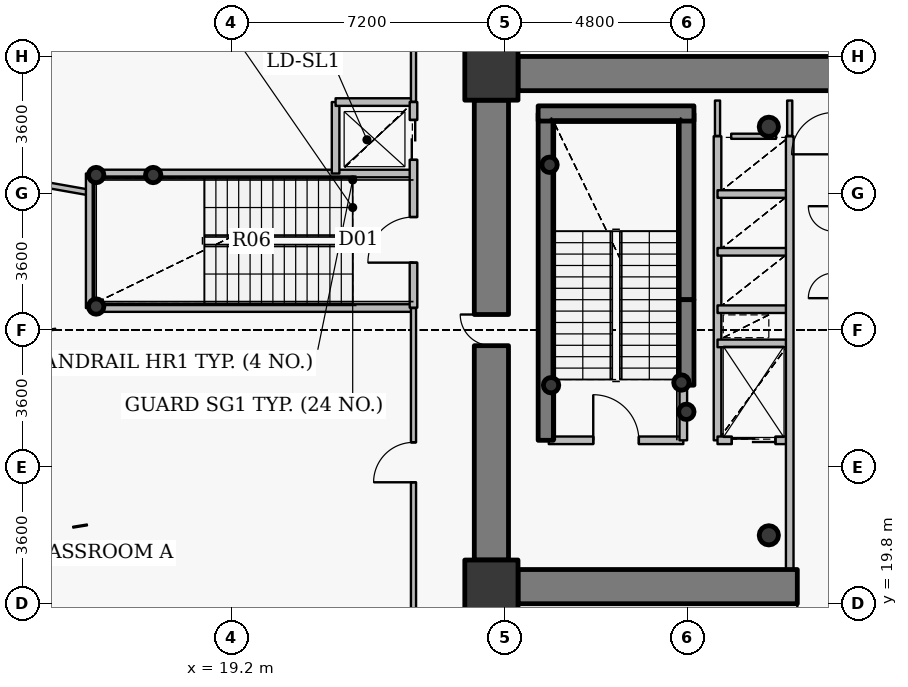
"""IFC4 building model, lengths in metres.
Left out: names, types, materials, properties, quantities, classifications, styles, units other than length and angle.
Written with IfcOpenShell. Run it as: python <this file> out.ifc"""

import sys

from ifc_helpers import new_model, si_unit, direction, frame, frame_2d, origin, origin_2d, place, context, subcontext, project, spatial, rectangle, hollow_circle, extrude, source, transform, mapped, element, fill, save


model = new_model("IFC4")
c1 = context("Model", 3, precision=1e-05, world=origin(), true_north=direction((0.0, 1.0)))
c2 = subcontext(c1, "Body", "Model", "MODEL_VIEW")
j1 = project(units=[si_unit("LENGTHUNIT", "METRE"), si_unit("PLANEANGLEUNIT", "RADIAN")], contexts=[c1])
p1 = place(None, origin())
s1 = spatial("IfcSite", under=j1, at=p1, CompositionType="ELEMENT")
p2 = place(p1, origin())
s2 = spatial("IfcBuilding", under=s1, at=p2, CompositionType="ELEMENT")
p3 = place(p2, frame((0.0, 0.0, 32.4)))
s3 = spatial("IfcBuildingStorey", under=s2, at=p3, CompositionType="ELEMENT", Elevation=32.4)
for number, where, z_axis, x_axis in (
    (1, (26.05, 20.25, 0.0), (0.0, 0.0, 1.0), (1.0, 0.0, 0.0)),
    (2, (26.05, 33.75, 0.0), (0.0, 0.0, 1.0), (1.0, 0.0, 0.0)),
):
    element("IfcColumn", number, at=place(p3, frame(where, z_axis=z_axis, x_axis=x_axis)), inside=s3, PredefinedType="COLUMN", context=c2, shape_type="SweptSolid", body=[
        extrude(rectangle(XDim=1.4, YDim=1.4, at=origin_2d()), origin(), (0.0, 0.0, 1.0), 4.2),
    ])
for number, where, z_axis, x_axis in (
    (3, (33.35, 21.6, 0.0), (0.0, 0.0, 1.0), (1.0, 0.0, 0.0)),
    (4, (33.35, 32.35, 0.0), (0.0, 0.0, 1.0), (1.0, 0.0, 0.0)),
):
    element("IfcColumn", number, at=place(p3, frame(where, z_axis=z_axis, x_axis=x_axis)), inside=s3, PredefinedType="COLUMN", context=c2, shape_type="SweptSolid", body=[
        extrude(hollow_circle(Radius=0.254, WallThickness=0.02, at=origin_2d()), origin(), (0.0, 0.0, 1.0), 4.2),
    ])
p4 = place(p3, frame((27.48, 24.1, 0.0), z_axis=(0.0, 0.0, 1.0), x_axis=(0.0, 1.0, 0.0)))
e5 = element("IfcWall", 5, at=p4, inside=s3, PredefinedType="SHEAR", context=c2, shape_type="SweptSolid", body=[
    extrude(rectangle(XDim=8.6, YDim=0.4, at=frame_2d((4.3, 0.0))), origin(), (0.0, 0.0, 1.0), 4.2),
])
p5 = place(p3, frame((31.18, 27.8, 0.0), z_axis=(0.0, 0.0, 1.0), x_axis=(0.0, 1.0, 0.0)))
e6 = element("IfcWall", 6, at=p5, inside=s3, PredefinedType="SHEAR", context=c2, shape_type="SweptSolid", body=[
    extrude(rectangle(XDim=4.9, YDim=0.4, at=frame_2d((2.45, 0.0))), origin(), (0.0, 0.0, 1.0), 4.2),
])
p6 = place(p3, frame((27.28, 32.7, 0.0), z_axis=(0.0, 0.0, 1.0), x_axis=(1.0, 0.0, 0.0)))
e7 = element("IfcWall", 7, at=p6, inside=s3, PredefinedType="SHEAR", context=c2, shape_type="SweptSolid", body=[
    extrude(rectangle(XDim=4.1, YDim=0.4, at=frame_2d((2.05, 0.0))), origin(), (0.0, 0.0, 1.0), 4.2),
])
for number, where, z_axis, x_axis in (
    (8, (27.58, 31.35, 0.0), (0.0, 0.0, 1.0), (1.0, 0.0, 0.0)),
    (9, (31.05, 25.62, 0.0), (0.0, 0.0, 1.0), (1.0, 0.0, 0.0)),
    (10, (31.18, 24.85, 0.0), (0.0, 0.0, 1.0), (1.0, 0.0, 0.0)),
    (11, (27.62, 25.55, 0.0), (0.0, 0.0, 1.0), (1.0, 0.0, 0.0)),
    (12, (15.65, 27.62, 0.0), (0.0, 0.0, 1.0), (1.0, 0.0, 0.0)),
    (13, (15.65, 31.08, 0.0), (0.0, 0.0, 1.0), (1.0, 0.0, 0.0)),
    (14, (17.15, 31.08, 0.0), (0.0, 0.0, 1.0), (1.0, 0.0, 0.0)),
):
    element("IfcColumn", number, at=place(p3, frame(where, z_axis=z_axis, x_axis=x_axis)), inside=s3, PredefinedType="COLUMN", context=c2, shape_type="SweptSolid", body=[
        extrude(hollow_circle(Radius=0.203, WallThickness=0.016, at=origin_2d()), origin(), (0.0, 0.0, 1.0), 4.2),
    ])
p7 = place(p3, frame((26.75, 33.75, 0.0), z_axis=(0.0, 0.0, 1.0), x_axis=(1.0, 0.0, 0.0)))
e15 = element("IfcWall", 15, at=p7, inside=s3, PredefinedType="SHEAR", context=c2, shape_type="SweptSolid", body=[
    extrude(rectangle(XDim=18.5, YDim=0.9, at=frame_2d((9.25, 0.0))), origin(), (0.0, 0.0, 1.0), 3.4),
])
p8 = place(p3, frame((45.25, 20.25, 0.0), z_axis=(0.0, 0.0, 1.0), x_axis=(-1.0, 0.0, 0.0)))
e16 = element("IfcWall", 16, at=p8, inside=s3, PredefinedType="SHEAR", context=c2, shape_type="SweptSolid", body=[
    extrude(rectangle(XDim=18.5, YDim=0.9, at=frame_2d((9.25, 0.0))), origin(), (0.0, 0.0, 1.0), 3.4),
])
p9 = place(p8, frame((10.0, 0.0, 0.0)))
e17 = element("IfcOpeningElement", 17, at=p9, cuts=e16, PredefinedType="OPENING", context=c2, shape_type="SweptSolid", body=[
    extrude(rectangle(XDim=1.15, YDim=2.15, at=origin_2d()), frame((0.575, 0.46, 1.075), z_axis=(0.0, -1.0, 0.0), x_axis=(1.0, 0.0, 0.0)), (0.0, 0.0, 1.0), 0.92),
])
p10 = place(p3, frame((26.05, 20.95, 0.0), z_axis=(0.0, 0.0, 1.0), x_axis=(0.0, 1.0, 0.0)))
e18 = element("IfcWall", 18, at=p10, inside=s3, PredefinedType="SHEAR", context=c2, shape_type="SweptSolid", body=[
    extrude(rectangle(XDim=12.1, YDim=0.9, at=frame_2d((6.05, 0.0))), origin(), (0.0, 0.0, 1.0), 3.4),
])
p11 = place(p10, frame((5.64, 0.0, 0.0)))
e19 = element("IfcOpeningElement", 19, at=p11, cuts=e18, PredefinedType="OPENING", context=c2, shape_type="SweptSolid", body=[
    extrude(rectangle(XDim=0.82, YDim=2.1, at=origin_2d()), frame((0.41, 0.46, 1.05), z_axis=(0.0, -1.0, 0.0), x_axis=(1.0, 0.0, 0.0)), (0.0, 0.0, 1.0), 0.92),
])
p12 = place(p3, frame((31.18, 25.55, 0.0), z_axis=(0.0, 0.0, 1.0), x_axis=(0.0, 1.0, 0.0)))
e20 = element("IfcWall", 20, at=p12, inside=s3, PredefinedType="SHEAR", context=c2, shape_type="SweptSolid", body=[
    extrude(rectangle(XDim=2.25, YDim=0.4, at=frame_2d((1.125, 0.0))), origin(), (0.0, 0.0, 1.0), 3.55),
])
p13 = place(p3, frame((5.771, 32.33, 0.0), z_axis=(0.0, 0.0, 1.0), x_axis=(0.984806985247, -0.173652531825, 0.0)))
e21 = element("IfcWall", 21, at=p13, inside=s3, PredefinedType="PARTITIONING", context=c2, shape_type="SweptSolid", body=[
    extrude(rectangle(XDim=9.858, YDim=0.15, at=frame_2d((4.929, 0.0))), origin(), (0.0, 0.0, 1.0), 3.335),
])
p14 = place(p3, frame((15.48, 27.58, 0.0), z_axis=(0.0, 0.0, 1.0), x_axis=(0.0, 1.0, 0.0)))
e22 = element("IfcWall", 22, at=p14, inside=s3, PredefinedType="PARTITIONING", context=c2, shape_type="SweptSolid", body=[
    extrude(rectangle(XDim=3.54, YDim=0.2, at=frame_2d((1.77, 0.0))), origin(), (0.0, 0.0, 1.0), 3.95),
])
for number, where, z_axis, x_axis in (
    (23, (15.48, 27.58, 0.0), (0.0, 0.0, 1.0), (1.0, 0.0, 0.0)),
    (24, (15.48, 31.12, 0.0), (0.0, 0.0, 1.0), (1.0, 0.0, 0.0)),
):
    element("IfcWall", number, at=place(p3, frame(where, z_axis=z_axis, x_axis=x_axis)), inside=s3, PredefinedType="PARTITIONING", context=c2, shape_type="SweptSolid", body=[
        extrude(rectangle(XDim=8.52, YDim=0.2, at=frame_2d((4.26, 0.0))), origin(), (0.0, 0.0, 1.0), 3.95),
    ])
p15 = place(p3, frame((21.95, 31.12, 0.0), z_axis=(0.0, 0.0, 1.0), x_axis=(0.0, 1.0, 0.0)))
e25 = element("IfcWall", 25, at=p15, inside=s3, PredefinedType="PARTITIONING", context=c2, shape_type="SweptSolid", body=[
    extrude(rectangle(XDim=1.88, YDim=0.2, at=frame_2d((0.94, 0.0))), origin(), (0.0, 0.0, 1.0), 3.285),
])
p16 = place(p3, frame((21.95, 33.0, 0.0), z_axis=(0.0, 0.0, 1.0), x_axis=(1.0, 0.0, 0.0)))
e26 = element("IfcWall", 26, at=p16, inside=s3, PredefinedType="PARTITIONING", context=c2, shape_type="SweptSolid", body=[
    extrude(rectangle(XDim=2.05, YDim=0.2, at=frame_2d((1.025, 0.0))), origin(), (0.0, 0.0, 1.0), 3.95),
])
p17 = place(p3, frame((24.0, 14.8, 0.0), z_axis=(0.0, 0.0, 1.0), x_axis=(0.0, 1.0, 0.0)))
e27 = element("IfcWall", 27, at=p17, inside=s3, PredefinedType="PARTITIONING", context=c2, shape_type="SweptSolid", body=[
    extrude(rectangle(XDim=12.78, YDim=0.135, at=frame_2d((6.39, 0.0))), origin(), (0.0, 0.0, 1.0), 3.285),
])
p18 = place(p17, frame((8.196, 0.0, 0.0)))
e28 = element("IfcOpeningElement", 28, at=p18, cuts=e27, PredefinedType="OPENING", context=c2, shape_type="SweptSolid", body=[
    extrude(rectangle(XDim=1.05, YDim=2.15, at=origin_2d()), frame((0.525, 0.078, 1.075), z_axis=(0.0, -1.0, 0.0), x_axis=(1.0, 0.0, 0.0)), (0.0, 0.0, 1.0), 0.155),
])
p19 = place(p3, frame((24.0, 27.59, 0.0), z_axis=(0.0, 0.0, 1.0), x_axis=(0.0, 1.0, 0.0)))
e29 = element("IfcWall", 29, at=p19, inside=s3, PredefinedType="PARTITIONING", context=c2, shape_type="SweptSolid", body=[
    extrude(rectangle(XDim=5.41, YDim=0.2, at=frame_2d((2.705, 0.0))), origin(), (0.0, 0.0, 1.0), 3.285),
])
p20 = place(p19, frame((1.185, 0.0, 0.0)))
e30 = element("IfcOpeningElement", 30, at=p20, cuts=e29, PredefinedType="OPENING", context=c2, shape_type="SweptSolid", body=[
    extrude(rectangle(XDim=1.2, YDim=2.15, at=origin_2d()), frame((0.6, 0.11, 1.075), z_axis=(0.0, -1.0, 0.0), x_axis=(1.0, 0.0, 0.0)), (0.0, 0.0, 1.0), 0.22),
])
p21 = place(p19, frame((3.89, 0.0, 0.0)))
e31 = element("IfcOpeningElement", 31, at=p21, cuts=e29, PredefinedType="OPENING", context=c2, shape_type="SweptSolid", body=[
    extrude(rectangle(XDim=1.05, YDim=2.15, at=origin_2d()), frame((0.525, 0.11, 1.075), z_axis=(0.0, -1.0, 0.0), x_axis=(1.0, 0.0, 0.0)), (0.0, 0.0, 1.0), 0.22),
])
p22 = place(p3, frame((24.0, 33.01, 0.0), z_axis=(0.0, 0.0, 1.0), x_axis=(0.0, 1.0, 0.0)))
e32 = element("IfcWall", 32, at=p22, inside=s3, PredefinedType="PARTITIONING", context=c2, shape_type="SweptSolid", body=[
    extrude(rectangle(XDim=8.19, YDim=0.135, at=frame_2d((4.095, 0.0))), origin(), (0.0, 0.0, 1.0), 3.285),
])
p23 = place(p22, frame((3.57, 0.0, 0.0)))
e33 = element("IfcOpeningElement", 33, at=p23, cuts=e32, PredefinedType="OPENING", context=c2, shape_type="SweptSolid", body=[
    extrude(rectangle(XDim=1.05, YDim=2.15, at=origin_2d()), frame((0.525, 0.078, 1.075), z_axis=(0.0, -1.0, 0.0), x_axis=(1.0, 0.0, 0.0)), (0.0, 0.0, 1.0), 0.155),
])
p24 = place(p3, frame((27.56, 24.1, 0.0), z_axis=(0.0, 0.0, 1.0), x_axis=(1.0, 0.0, 0.0)))
e34 = element("IfcWall", 34, at=p24, inside=s3, PredefinedType="PARTITIONING", context=c2, shape_type="SweptSolid", body=[
    extrude(rectangle(XDim=3.54, YDim=0.2, at=frame_2d((1.77, 0.0))), origin(), (0.0, 0.0, 1.0), 3.95),
])
p25 = place(p24, frame((1.17, 0.0, 0.0)))
e35 = element("IfcOpeningElement", 35, at=p25, cuts=e34, PredefinedType="OPENING", context=c2, shape_type="SweptSolid", body=[
    extrude(rectangle(XDim=1.2, YDim=2.15, at=origin_2d()), frame((0.6, 0.11, 1.075), z_axis=(0.0, -1.0, 0.0), x_axis=(1.0, 0.0, 0.0)), (0.0, 0.0, 1.0), 0.22),
])
p26 = place(p3, frame((31.1, 24.1, 0.0), z_axis=(0.0, 0.0, 1.0), x_axis=(0.0, 1.0, 0.0)))
e36 = element("IfcWall", 36, at=p26, inside=s3, PredefinedType="PARTITIONING", context=c2, shape_type="SweptSolid", body=[
    extrude(rectangle(XDim=1.44, YDim=0.2, at=frame_2d((0.72, 0.0))), origin(), (0.0, 0.0, 1.0), 3.95),
])
p27 = place(p3, frame((32.0, 24.1, 0.0), z_axis=(0.0, 0.0, 1.0), x_axis=(0.0, 1.0, 0.0)))
e37 = element("IfcWall", 37, at=p27, inside=s3, PredefinedType="PARTITIONING", context=c2, shape_type="SweptSolid", body=[
    extrude(rectangle(XDim=8.0, YDim=0.2, at=frame_2d((4.0, 0.0))), origin(), (0.0, 0.0, 1.0), 3.95),
])
p28 = place(p3, frame((32.0, 24.1, 0.0), z_axis=(0.0, 0.0, 1.0), x_axis=(1.0, 0.0, 0.0)))
e38 = element("IfcWall", 38, at=p28, inside=s3, PredefinedType="PARTITIONING", context=c2, shape_type="SweptSolid", body=[
    extrude(rectangle(XDim=1.9, YDim=0.2, at=frame_2d((0.95, 0.0))), origin(), (0.0, 0.0, 1.0), 3.535),
])
p29 = place(p28, frame((0.375, 0.0, 0.0)))
e39 = element("IfcOpeningElement", 39, at=p29, cuts=e38, PredefinedType="OPENING", context=c2, shape_type="SweptSolid", body=[
    extrude(rectangle(XDim=1.15, YDim=2.15, at=origin_2d()), frame((0.575, 0.11, 1.075), z_axis=(0.0, -1.0, 0.0), x_axis=(1.0, 0.0, 0.0)), (0.0, 0.0, 1.0), 0.22),
])
for number, where, z_axis, x_axis in (
    (40, (32.0, 26.65, 0.0), (0.0, 0.0, 1.0), (1.0, 0.0, 0.0)),
    (41, (32.0, 27.55, 0.0), (0.0, 0.0, 1.0), (1.0, 0.0, 0.0)),
    (42, (32.0, 29.06, 0.0), (0.0, 0.0, 1.0), (1.0, 0.0, 0.0)),
    (43, (32.0, 30.58, 0.0), (0.0, 0.0, 1.0), (1.0, 0.0, 0.0)),
):
    element("IfcWall", number, at=place(p3, frame(where, z_axis=z_axis, x_axis=x_axis)), inside=s3, PredefinedType="PARTITIONING", context=c2, shape_type="SweptSolid", body=[
        extrude(rectangle(XDim=1.9, YDim=0.2, at=frame_2d((0.95, 0.0))), origin(), (0.0, 0.0, 1.0), 3.535),
    ])
p30 = place(p3, frame((33.9, 20.7, 0.0), z_axis=(0.0, 0.0, 1.0), x_axis=(0.0, 1.0, 0.0)))
e44 = element("IfcWall", 44, at=p30, inside=s3, PredefinedType="PARTITIONING", context=c2, shape_type="SweptSolid", body=[
    extrude(rectangle(XDim=11.4, YDim=0.2, at=frame_2d((5.7, 0.0))), origin(), (0.0, 0.0, 1.0), 3.535),
])
p31 = place(p3, frame((32.36, 32.1, 0.0), z_axis=(0.0, 0.0, 1.0), x_axis=(1.0, 0.0, 0.0)))
e45 = element("IfcWall", 45, at=p31, inside=s3, PredefinedType="PARTITIONING", context=c2, shape_type="SweptSolid", body=[
    extrude(rectangle(XDim=1.18, YDim=0.135, at=frame_2d((0.59, 0.0))), origin(), (0.0, 0.0, 1.0), 3.535),
])
p32 = place(p3, frame((32.0, 33.04, 0.0), z_axis=(0.0, 0.0, 1.0), x_axis=(0.0, -1.0, 0.0)))
e46 = element("IfcWall", 46, at=p32, inside=s3, PredefinedType="PARTITIONING", context=c2, shape_type="SweptSolid", body=[
    extrude(rectangle(XDim=0.93, YDim=0.135, at=frame_2d((0.465, 0.0))), origin(), (0.0, 0.0, 1.0), 3.485),
])
p33 = place(p3, frame((33.9, 32.11, 0.0), z_axis=(0.0, 0.0, 1.0), x_axis=(0.0, 1.0, 0.0)))
e47 = element("IfcWall", 47, at=p33, inside=s3, PredefinedType="PARTITIONING", context=c2, shape_type="SweptSolid", body=[
    extrude(rectangle(XDim=0.93, YDim=0.135, at=frame_2d((0.465, 0.0))), origin(), (0.0, 0.0, 1.0), 3.535),
])
p34 = place(p3, frame((25.95, 38.893, 0.0), z_axis=(0.0, 0.0, 1.0), x_axis=(0.0, -1.0, 0.0)))
e48 = element("IfcWall", 48, at=p34, inside=s3, PredefinedType="PARTITIONING", context=c2, shape_type="SweptSolid", body=[
    extrude(rectangle(XDim=4.693, YDim=0.135, at=frame_2d((2.346, 0.0))), origin(), (0.0, 0.0, 1.0), 3.285),
])
for number, where, z_axis, x_axis in (
    (49, (25.6, 34.2, 0.0), (0.0, 0.0, 1.0), (0.0, -1.0, 0.0)),
    (50, (25.6, 20.94, 0.0), (0.0, 0.0, 1.0), (0.0, -1.0, 0.0)),
):
    element("IfcWall", number, at=place(p3, frame(where, z_axis=z_axis, x_axis=x_axis)), inside=s3, PredefinedType="PARTITIONING", context=c2, shape_type="SweptSolid", body=[
        extrude(rectangle(XDim=1.14, YDim=0.135, at=frame_2d((0.57, 0.0))), origin(), (0.0, 0.0, 1.0), 3.95),
    ])
p35 = place(p3, frame((25.907, 19.8, 0.0), z_axis=(0.0, 0.0, 1.0), x_axis=(1.0, 0.0, 0.0)))
e51 = element("IfcWall", 51, at=p35, inside=s3, PredefinedType="PARTITIONING", context=c2, shape_type="SweptSolid", body=[
    extrude(rectangle(XDim=0.833, YDim=0.135, at=frame_2d((0.416, 0.0))), origin(), (0.0, 0.0, 1.0), 3.285),
])
m1 = source(origin(), c2, "Body", "SweptSolid", [
    extrude(rectangle(XDim=0.82, YDim=2.1, at=origin_2d()), frame((0.41, 0.025, 1.05), z_axis=(0.0, -1.0, 0.0), x_axis=(1.0, 0.0, 0.0)), (0.0, 0.0, 1.0), 0.05),
])
p36 = place(p11, origin())
e52 = element("IfcDoor", 52, at=p36, inside=s3, OperationType="SINGLE_SWING_RIGHT", PredefinedType="DOOR", context=c2, shape_type="MappedRepresentation", body=[
    mapped(m1, transform((0.0, 0.0, 0.0), x_axis=(1.0, 0.0, 0.0), y_axis=(0.0, 1.0, 0.0), z_axis=(0.0, 0.0, 1.0), scale=1.0)),
])
fill(e19, e52)
m2 = source(origin(), c2, "Body", "SweptSolid", [
    extrude(rectangle(XDim=1.15, YDim=2.15, at=origin_2d()), frame((0.575, 0.025, 1.075), z_axis=(0.0, -1.0, 0.0), x_axis=(1.0, 0.0, 0.0)), (0.0, 0.0, 1.0), 0.05),
])
p37 = place(p9, origin())
e53 = element("IfcDoor", 53, at=p37, inside=s3, OperationType="SINGLE_SWING_RIGHT", PredefinedType="DOOR", context=c2, shape_type="MappedRepresentation", body=[
    mapped(m2, transform((0.0, 0.0, 0.0), x_axis=(1.0, 0.0, 0.0), y_axis=(0.0, 1.0, 0.0), z_axis=(0.0, 0.0, 1.0), scale=1.0)),
])
fill(e17, e53)
m3 = source(origin(), c2, "Body", "SweptSolid", [
    extrude(rectangle(XDim=1.2, YDim=2.15, at=origin_2d()), frame((0.6, 0.025, 1.075), z_axis=(0.0, -1.0, 0.0), x_axis=(1.0, 0.0, 0.0)), (0.0, 0.0, 1.0), 0.05),
])
p38 = place(p25, origin())
e54 = element("IfcDoor", 54, at=p38, inside=s3, OperationType="SINGLE_SWING_LEFT", PredefinedType="DOOR", context=c2, shape_type="MappedRepresentation", body=[
    mapped(m3, transform((0.0, 0.0, 0.0), x_axis=(1.0, 0.0, 0.0), y_axis=(0.0, 1.0, 0.0), z_axis=(0.0, 0.0, 1.0), scale=1.0)),
])
fill(e35, e54)
p39 = place(p20, origin())
e55 = element("IfcDoor", 55, at=p39, inside=s3, OperationType="SINGLE_SWING_LEFT", PredefinedType="DOOR", context=c2, shape_type="MappedRepresentation", body=[
    mapped(m3, transform((0.0, 0.0, 0.0), x_axis=(1.0, 0.0, 0.0), y_axis=(0.0, 1.0, 0.0), z_axis=(0.0, 0.0, 1.0), scale=1.0)),
])
fill(e30, e55)
m4 = source(origin(), c2, "Body", "SweptSolid", [
    extrude(rectangle(XDim=1.15, YDim=2.15, at=origin_2d()), frame((0.575, 0.025, 1.075), z_axis=(0.0, -1.0, 0.0), x_axis=(1.0, 0.0, 0.0)), (0.0, 0.0, 1.0), 0.05),
])
p40 = place(p29, origin())
e56 = element("IfcDoor", 56, at=p40, inside=s3, OperationType="DOUBLE_DOOR_SLIDING", PredefinedType="USERDEFINED", context=c2, shape_type="MappedRepresentation", body=[
    mapped(m4, transform((0.0, 0.0, 0.0), x_axis=(1.0, 0.0, 0.0), y_axis=(0.0, 1.0, 0.0), z_axis=(0.0, 0.0, 1.0), scale=1.0)),
])
fill(e39, e56)
m5 = source(origin(), c2, "Body", "SweptSolid", [
    extrude(rectangle(XDim=1.05, YDim=2.15, at=origin_2d()), frame((0.525, 0.025, 1.075), z_axis=(0.0, -1.0, 0.0), x_axis=(1.0, 0.0, 0.0)), (0.0, 0.0, 1.0), 0.05),
])
p41 = place(p21, origin())
e57 = element("IfcDoor", 57, at=p41, inside=s3, OperationType="DOUBLE_DOOR_SLIDING", PredefinedType="USERDEFINED", context=c2, shape_type="MappedRepresentation", body=[
    mapped(m5, transform((0.0, 0.0, 0.0), x_axis=(1.0, 0.0, 0.0), y_axis=(0.0, 1.0, 0.0), z_axis=(0.0, 0.0, 1.0), scale=1.0)),
])
fill(e31, e57)
m6 = source(origin(), c2, "Body", "SweptSolid", [
    extrude(rectangle(XDim=1.05, YDim=2.15, at=origin_2d()), frame((0.525, 0.025, 1.075), z_axis=(0.0, -1.0, 0.0), x_axis=(1.0, 0.0, 0.0)), (0.0, 0.0, 1.0), 0.05),
])
p42 = place(p18, origin())
e58 = element("IfcDoor", 58, at=p42, inside=s3, OperationType="SINGLE_SWING_LEFT", PredefinedType="DOOR", context=c2, shape_type="MappedRepresentation", body=[
    mapped(m6, transform((0.0, 0.0, 0.0), x_axis=(1.0, 0.0, 0.0), y_axis=(0.0, 1.0, 0.0), z_axis=(0.0, 0.0, 1.0), scale=1.0)),
])
fill(e28, e58)
save(model, sys.argv[1])
